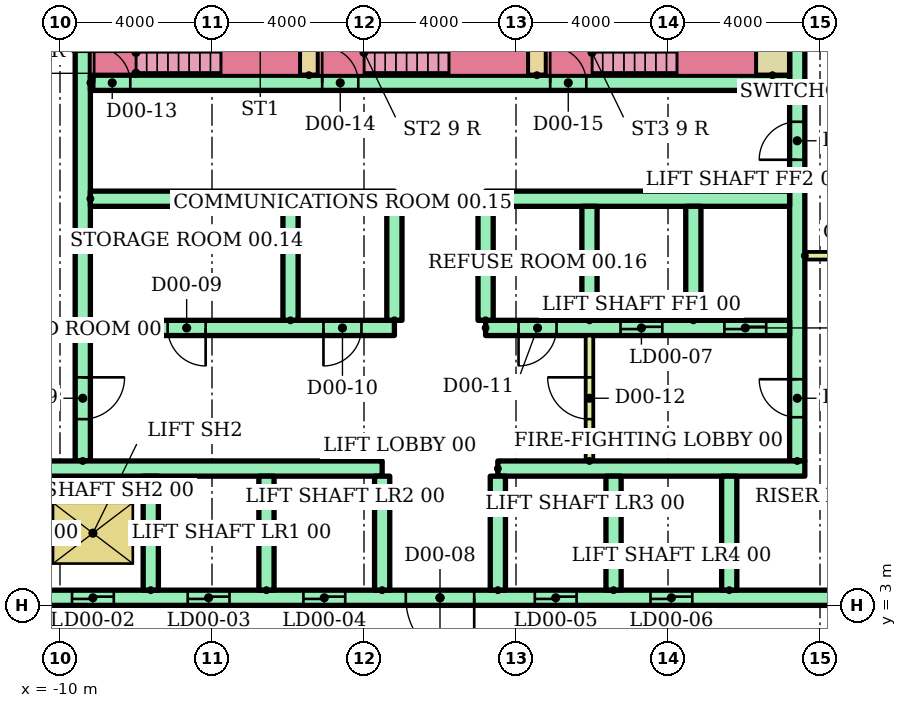
"""IFC4 building model, lengths in metres.
Left out: names, types, materials, properties, quantities, classifications, styles, units other than length and angle.
Written with IfcOpenShell. Run it as: python <this file> out.ifc"""

import sys

from ifc_helpers import new_model, si_unit, direction, frame, frame_2d, origin, place, context, subcontext, project, spatial, rectangle, extrude, element, fill, save


model = new_model("IFC4")
c1 = context("Model", 3, precision=1e-05, world=origin(), true_north=direction((0.0, 1.0)))
c2 = subcontext(c1, "Body", "Model", "MODEL_VIEW")
j1 = project(units=[si_unit("LENGTHUNIT", "METRE"), si_unit("PLANEANGLEUNIT", "RADIAN")], contexts=[c1])
p1 = place(None, origin())
s1 = spatial("IfcSite", under=j1, at=p1, CompositionType="ELEMENT")
p2 = place(p1, origin())
s2 = spatial("IfcBuilding", under=s1, at=p2, CompositionType="ELEMENT")
p3 = place(p2, origin())
s3 = spatial("IfcBuildingStorey", under=s2, at=p3, CompositionType="ELEMENT", Elevation=0.0)
p4 = place(p3, frame((-9.4, 6.8, 0.0), z_axis=(0.0, 0.0, 1.0), x_axis=(0.0, 1.0, 0.0)))
e1 = element("IfcWall", 1, at=p4, inside=s3, PredefinedType="SHEAR", context=c2, shape_type="SweptSolid", body=[
    extrude(rectangle(XDim=12.7, YDim=0.4, at=frame_2d((6.35, 0.0))), origin(), (0.0, 0.0, 1.0), 5.7),
])
p5 = place(p4, frame((1.1, 0.0, 0.0)))
e2 = element("IfcOpeningElement", 2, at=p5, cuts=e1, PredefinedType="OPENING", context=c2, shape_type="SweptSolid", body=[
    extrude(rectangle(XDim=1.1, YDim=2.1, at=frame_2d((0.55, 1.05))), frame((0.0, 0.21, 0.0), z_axis=(0.0, -1.0, 0.0), x_axis=(1.0, 0.0, 0.0)), (0.0, 0.0, 1.0), 0.42),
])
p6 = place(p3, frame((9.4, 6.8, 0.0), z_axis=(0.0, 0.0, 1.0), x_axis=(0.0, 1.0, 0.0)))
e3 = element("IfcWall", 3, at=p6, inside=s3, PredefinedType="SHEAR", context=c2, shape_type="SweptSolid", body=[
    extrude(rectangle(XDim=12.7, YDim=0.4, at=frame_2d((6.35, 0.0))), origin(), (0.0, 0.0, 1.0), 5.7),
])
p7 = place(p6, frame((1.15, 0.0, 0.0)))
e4 = element("IfcOpeningElement", 4, at=p7, cuts=e3, PredefinedType="OPENING", context=c2, shape_type="SweptSolid", body=[
    extrude(rectangle(XDim=1.0, YDim=2.1, at=frame_2d((0.5, 1.05))), frame((0.0, 0.21, 0.0), z_axis=(0.0, -1.0, 0.0), x_axis=(1.0, 0.0, 0.0)), (0.0, 0.0, 1.0), 0.42),
])
p8 = place(p6, frame((7.925, 0.0, 0.0)))
e5 = element("IfcOpeningElement", 5, at=p8, cuts=e3, PredefinedType="OPENING", context=c2, shape_type="SweptSolid", body=[
    extrude(rectangle(XDim=1.0, YDim=2.1, at=frame_2d((0.5, 1.05))), frame((0.0, 0.21, 0.0), z_axis=(0.0, -1.0, 0.0), x_axis=(1.0, 0.0, 0.0)), (0.0, 0.0, 1.0), 0.42),
])
p9 = place(p3, frame((-13.5, 3.2, 0.0)))
e6 = element("IfcWall", 6, at=p9, inside=s3, PredefinedType="SHEAR", context=c2, shape_type="SweptSolid", body=[
    extrude(rectangle(XDim=27.0, YDim=0.4, at=frame_2d((13.5, 0.0))), origin(), (0.0, 0.0, 1.0), 5.7),
])
p10 = place(p9, frame((0.772, 0.0, 0.0)))
e7 = element("IfcOpeningElement", 7, at=p10, cuts=e6, PredefinedType="OPENING", context=c2, shape_type="SweptSolid", body=[
    extrude(rectangle(XDim=1.1, YDim=2.1, at=frame_2d((0.55, 1.05))), frame((0.0, 0.21, 0.0), z_axis=(0.0, -1.0, 0.0), x_axis=(1.0, 0.0, 0.0)), (0.0, 0.0, 1.0), 0.42),
])
p11 = place(p9, frame((3.817, 0.0, 0.0)))
e8 = element("IfcOpeningElement", 8, at=p11, cuts=e6, PredefinedType="OPENING", context=c2, shape_type="SweptSolid", body=[
    extrude(rectangle(XDim=1.1, YDim=2.1, at=frame_2d((0.55, 1.05))), frame((0.0, 0.21, 0.0), z_axis=(0.0, -1.0, 0.0), x_axis=(1.0, 0.0, 0.0)), (0.0, 0.0, 1.0), 0.42),
])
p12 = place(p9, frame((6.861, 0.0, 0.0)))
e9 = element("IfcOpeningElement", 9, at=p12, cuts=e6, PredefinedType="OPENING", context=c2, shape_type="SweptSolid", body=[
    extrude(rectangle(XDim=1.1, YDim=2.1, at=frame_2d((0.55, 1.05))), frame((0.0, 0.21, 0.0), z_axis=(0.0, -1.0, 0.0), x_axis=(1.0, 0.0, 0.0)), (0.0, 0.0, 1.0), 0.42),
])
p13 = place(p9, frame((9.906, 0.0, 0.0)))
e10 = element("IfcOpeningElement", 10, at=p13, cuts=e6, PredefinedType="OPENING", context=c2, shape_type="SweptSolid", body=[
    extrude(rectangle(XDim=1.1, YDim=2.1, at=frame_2d((0.55, 1.05))), frame((0.0, 0.21, 0.0), z_axis=(0.0, -1.0, 0.0), x_axis=(1.0, 0.0, 0.0)), (0.0, 0.0, 1.0), 0.42),
])
p14 = place(p9, frame((15.994, 0.0, 0.0)))
e11 = element("IfcOpeningElement", 11, at=p14, cuts=e6, PredefinedType="OPENING", context=c2, shape_type="SweptSolid", body=[
    extrude(rectangle(XDim=1.1, YDim=2.1, at=frame_2d((0.55, 1.05))), frame((0.0, 0.21, 0.0), z_axis=(0.0, -1.0, 0.0), x_axis=(1.0, 0.0, 0.0)), (0.0, 0.0, 1.0), 0.42),
])
p15 = place(p9, frame((19.039, 0.0, 0.0)))
e12 = element("IfcOpeningElement", 12, at=p15, cuts=e6, PredefinedType="OPENING", context=c2, shape_type="SweptSolid", body=[
    extrude(rectangle(XDim=1.1, YDim=2.1, at=frame_2d((0.55, 1.05))), frame((0.0, 0.21, 0.0), z_axis=(0.0, -1.0, 0.0), x_axis=(1.0, 0.0, 0.0)), (0.0, 0.0, 1.0), 0.42),
])
p16 = place(p9, frame((12.6, 0.0, 0.0)))
e13 = element("IfcOpeningElement", 13, at=p16, cuts=e6, PredefinedType="OPENING", context=c2, shape_type="SweptSolid", body=[
    extrude(rectangle(XDim=1.8, YDim=2.1, at=frame_2d((0.9, 1.05))), frame((0.0, 0.21, 0.0), z_axis=(0.0, -1.0, 0.0), x_axis=(1.0, 0.0, 0.0)), (0.0, 0.0, 1.0), 0.42),
])
p17 = place(p3, frame((-13.5, 6.6, 0.0)))
e14 = element("IfcWall", 14, at=p17, inside=s3, PredefinedType="SHEAR", context=c2, shape_type="SweptSolid", body=[
    extrude(rectangle(XDim=11.978, YDim=0.4, at=frame_2d((5.989, 0.0))), origin(), (0.0, 0.0, 1.0), 5.7),
])
p18 = place(p3, frame((1.522, 6.6, 0.0)))
e15 = element("IfcWall", 15, at=p18, inside=s3, PredefinedType="SHEAR", context=c2, shape_type="SweptSolid", body=[
    extrude(rectangle(XDim=8.078, YDim=0.4, at=frame_2d((4.039, 0.0))), origin(), (0.0, 0.0, 1.0), 5.7),
])
for number, where, z_axis, x_axis in (
    (16, (-7.611, 3.4, 0.0), (0.0, 0.0, 1.0), (0.0, 1.0, 0.0)),
    (17, (-4.567, 3.4, 0.0), (0.0, 0.0, 1.0), (0.0, 1.0, 0.0)),
    (18, (-1.522, 3.4, 0.0), (0.0, 0.0, 1.0), (0.0, 1.0, 0.0)),
    (19, (1.522, 3.4, 0.0), (0.0, 0.0, 1.0), (0.0, 1.0, 0.0)),
    (20, (4.567, 3.4, 0.0), (0.0, 0.0, 1.0), (0.0, 1.0, 0.0)),
    (21, (7.611, 3.4, 0.0), (0.0, 0.0, 1.0), (0.0, 1.0, 0.0)),
):
    element("IfcWall", number, at=place(p3, frame(where, z_axis=z_axis, x_axis=x_axis)), inside=s3, PredefinedType="SHEAR", context=c2, shape_type="SweptSolid", body=[
        extrude(rectangle(XDim=3.0, YDim=0.4, at=frame_2d((1.5, 0.0))), origin(), (0.0, 0.0, 1.0), 5.7),
    ])
p19 = place(p3, frame((-9.2, 10.3, 0.0)))
e22 = element("IfcWall", 22, at=p19, inside=s3, PredefinedType="SHEAR", context=c2, shape_type="SweptSolid", body=[
    extrude(rectangle(XDim=8.0, YDim=0.4, at=frame_2d((4.0, 0.0))), origin(), (0.0, 0.0, 1.0), 5.7),
])
p20 = place(p19, frame((2.033, 0.0, 0.0)))
e23 = element("IfcOpeningElement", 23, at=p20, cuts=e22, PredefinedType="OPENING", context=c2, shape_type="SweptSolid", body=[
    extrude(rectangle(XDim=1.0, YDim=2.1, at=frame_2d((0.5, 1.05))), frame((0.0, 0.21, 0.0), z_axis=(0.0, -1.0, 0.0), x_axis=(1.0, 0.0, 0.0)), (0.0, 0.0, 1.0), 0.42),
])
p21 = place(p19, frame((6.133, 0.0, 0.0)))
e24 = element("IfcOpeningElement", 24, at=p21, cuts=e22, PredefinedType="OPENING", context=c2, shape_type="SweptSolid", body=[
    extrude(rectangle(XDim=1.0, YDim=2.1, at=frame_2d((0.5, 1.05))), frame((0.0, 0.21, 0.0), z_axis=(0.0, -1.0, 0.0), x_axis=(1.0, 0.0, 0.0)), (0.0, 0.0, 1.0), 0.42),
])
p22 = place(p3, frame((-9.2, 13.7, 0.0)))
e25 = element("IfcWall", 25, at=p22, inside=s3, PredefinedType="SHEAR", context=c2, shape_type="SweptSolid", body=[
    extrude(rectangle(XDim=8.0, YDim=0.4, at=frame_2d((4.0, 0.0))), origin(), (0.0, 0.0, 1.0), 5.7),
])
p23 = place(p3, frame((1.2, 10.3, 0.0)))
e26 = element("IfcWall", 26, at=p23, inside=s3, PredefinedType="SHEAR", context=c2, shape_type="SweptSolid", body=[
    extrude(rectangle(XDim=8.0, YDim=0.4, at=frame_2d((4.0, 0.0))), origin(), (0.0, 0.0, 1.0), 5.7),
])
p24 = place(p23, frame((3.55, 0.0, 0.0)))
e27 = element("IfcOpeningElement", 27, at=p24, cuts=e26, PredefinedType="OPENING", context=c2, shape_type="SweptSolid", body=[
    extrude(rectangle(XDim=1.1, YDim=2.1, at=frame_2d((0.55, 1.05))), frame((0.0, 0.21, 0.0), z_axis=(0.0, -1.0, 0.0), x_axis=(1.0, 0.0, 0.0)), (0.0, 0.0, 1.0), 0.42),
])
p25 = place(p23, frame((6.283, 0.0, 0.0)))
e28 = element("IfcOpeningElement", 28, at=p25, cuts=e26, PredefinedType="OPENING", context=c2, shape_type="SweptSolid", body=[
    extrude(rectangle(XDim=1.1, YDim=2.1, at=frame_2d((0.55, 1.05))), frame((0.0, 0.21, 0.0), z_axis=(0.0, -1.0, 0.0), x_axis=(1.0, 0.0, 0.0)), (0.0, 0.0, 1.0), 0.42),
])
p26 = place(p23, frame((0.867, 0.0, 0.0)))
e29 = element("IfcOpeningElement", 29, at=p26, cuts=e26, PredefinedType="OPENING", context=c2, shape_type="SweptSolid", body=[
    extrude(rectangle(XDim=1.0, YDim=2.1, at=frame_2d((0.5, 1.05))), frame((0.0, 0.21, 0.0), z_axis=(0.0, -1.0, 0.0), x_axis=(1.0, 0.0, 0.0)), (0.0, 0.0, 1.0), 0.42),
])
p27 = place(p3, frame((1.2, 13.7, 0.0)))
e30 = element("IfcWall", 30, at=p27, inside=s3, PredefinedType="SHEAR", context=c2, shape_type="SweptSolid", body=[
    extrude(rectangle(XDim=8.0, YDim=0.4, at=frame_2d((4.0, 0.0))), origin(), (0.0, 0.0, 1.0), 5.7),
])
for number, where, z_axis, x_axis in (
    (31, (-3.933, 10.5, 0.0), (0.0, 0.0, 1.0), (0.0, 1.0, 0.0)),
    (32, (-1.2, 10.5, 0.0), (0.0, 0.0, 1.0), (0.0, 1.0, 0.0)),
    (33, (1.2, 10.5, 0.0), (0.0, 0.0, 1.0), (0.0, 1.0, 0.0)),
    (34, (3.933, 10.5, 0.0), (0.0, 0.0, 1.0), (0.0, 1.0, 0.0)),
    (35, (6.667, 10.5, 0.0), (0.0, 0.0, 1.0), (0.0, 1.0, 0.0)),
):
    element("IfcWall", number, at=place(p3, frame(where, z_axis=z_axis, x_axis=x_axis)), inside=s3, PredefinedType="SHEAR", context=c2, shape_type="SweptSolid", body=[
        extrude(rectangle(XDim=3.0, YDim=0.4, at=frame_2d((1.5, 0.0))), origin(), (0.0, 0.0, 1.0), 5.7),
    ])
p28 = place(p3, frame((3.933, 6.8, 0.0), z_axis=(0.0, 0.0, 1.0), x_axis=(0.0, 1.0, 0.0)))
e36 = element("IfcWall", 36, at=p28, inside=s3, PredefinedType="PARTITIONING", context=c2, shape_type="SweptSolid", body=[
    extrude(rectangle(XDim=3.3, YDim=0.2, at=frame_2d((1.65, 0.0))), origin(), (0.0, 0.0, 1.0), 5.7),
])
p29 = place(p28, frame((1.1, 0.0, 0.0)))
e37 = element("IfcOpeningElement", 37, at=p29, cuts=e36, PredefinedType="OPENING", context=c2, shape_type="SweptSolid", body=[
    extrude(rectangle(XDim=1.1, YDim=2.1, at=frame_2d((0.55, 1.05))), frame((0.0, 0.11, 0.0), z_axis=(0.0, -1.0, 0.0), x_axis=(1.0, 0.0, 0.0)), (0.0, 0.0, 1.0), 0.22),
])
p30 = place(p3, frame((-9.2, 16.75, 0.0)))
e38 = element("IfcWall", 38, at=p30, inside=s3, PredefinedType="SHEAR", context=c2, shape_type="SweptSolid", body=[
    extrude(rectangle(XDim=18.4, YDim=0.4, at=frame_2d((9.2, 0.0))), origin(), (0.0, 0.0, 1.0), 5.7),
])
p31 = place(p30, frame((0.1, 0.0, 0.0)))
e39 = element("IfcOpeningElement", 39, at=p31, cuts=e38, PredefinedType="OPENING", context=c2, shape_type="SweptSolid", body=[
    extrude(rectangle(XDim=0.95, YDim=2.1, at=frame_2d((0.475, 1.05))), frame((0.0, 0.21, 0.0), z_axis=(0.0, -1.0, 0.0), x_axis=(1.0, 0.0, 0.0)), (0.0, 0.0, 1.0), 0.42),
])
p32 = place(p30, frame((6.1, 0.0, 0.0)))
e40 = element("IfcOpeningElement", 40, at=p32, cuts=e38, PredefinedType="OPENING", context=c2, shape_type="SweptSolid", body=[
    extrude(rectangle(XDim=0.95, YDim=2.1, at=frame_2d((0.475, 1.05))), frame((0.0, 0.21, 0.0), z_axis=(0.0, -1.0, 0.0), x_axis=(1.0, 0.0, 0.0)), (0.0, 0.0, 1.0), 0.42),
])
p33 = place(p30, frame((12.1, 0.0, 0.0)))
e41 = element("IfcOpeningElement", 41, at=p33, cuts=e38, PredefinedType="OPENING", context=c2, shape_type="SweptSolid", body=[
    extrude(rectangle(XDim=0.95, YDim=2.1, at=frame_2d((0.475, 1.05))), frame((0.0, 0.21, 0.0), z_axis=(0.0, -1.0, 0.0), x_axis=(1.0, 0.0, 0.0)), (0.0, 0.0, 1.0), 0.42),
])
for number, where, z_axis, x_axis in (
    (42, (-3.45, 16.95, 0.0), (0.0, 0.0, 1.0), (0.0, 1.0, 0.0)),
    (43, (2.55, 16.95, 0.0), (0.0, 0.0, 1.0), (0.0, 1.0, 0.0)),
):
    element("IfcWall", number, at=place(p3, frame(where, z_axis=z_axis, x_axis=x_axis)), inside=s3, PredefinedType="SHEAR", context=c2, shape_type="SweptSolid", body=[
        extrude(rectangle(XDim=2.55, YDim=0.5, at=frame_2d((1.275, 0.0))), origin(), (0.0, 0.0, 1.0), 5.7),
    ])
p34 = place(p3, frame((8.75, 16.95, 0.0), z_axis=(0.0, 0.0, 1.0), x_axis=(0.0, 1.0, 0.0)))
e44 = element("IfcWall", 44, at=p34, inside=s3, PredefinedType="SHEAR", context=c2, shape_type="SweptSolid", body=[
    extrude(rectangle(XDim=2.55, YDim=0.9, at=frame_2d((1.275, 0.0))), origin(), (0.0, 0.0, 1.0), 5.7),
])
p35 = place(p3, frame((9.6, 12.2, 0.0)))
e45 = element("IfcWall", 45, at=p35, inside=s3, PredefinedType="PARTITIONING", context=c2, shape_type="SweptSolid", body=[
    extrude(rectangle(XDim=3.9, YDim=0.2, at=frame_2d((1.95, 0.0))), origin(), (0.0, 0.0, 1.0), 5.7),
])
p36 = place(p11, origin())
e46 = element("IfcDoor", 46, at=p36, inside=s3, OperationType="SLIDING_TO_LEFT", PredefinedType="DOOR", context=c2, shape_type="SweptSolid", body=[
    extrude(rectangle(XDim=1.1, YDim=2.1, at=frame_2d((0.55, 1.05))), frame((0.0, 0.025, 0.0), z_axis=(0.0, -1.0, 0.0), x_axis=(1.0, 0.0, 0.0)), (0.0, 0.0, 1.0), 0.05),
])
fill(e8, e46)
p37 = place(p12, origin())
e47 = element("IfcDoor", 47, at=p37, inside=s3, OperationType="SLIDING_TO_LEFT", PredefinedType="DOOR", context=c2, shape_type="SweptSolid", body=[
    extrude(rectangle(XDim=1.1, YDim=2.1, at=frame_2d((0.55, 1.05))), frame((0.0, 0.025, 0.0), z_axis=(0.0, -1.0, 0.0), x_axis=(1.0, 0.0, 0.0)), (0.0, 0.0, 1.0), 0.05),
])
fill(e9, e47)
p38 = place(p13, origin())
e48 = element("IfcDoor", 48, at=p38, inside=s3, OperationType="SLIDING_TO_LEFT", PredefinedType="DOOR", context=c2, shape_type="SweptSolid", body=[
    extrude(rectangle(XDim=1.1, YDim=2.1, at=frame_2d((0.55, 1.05))), frame((0.0, 0.025, 0.0), z_axis=(0.0, -1.0, 0.0), x_axis=(1.0, 0.0, 0.0)), (0.0, 0.0, 1.0), 0.05),
])
fill(e10, e48)
p39 = place(p14, origin())
e49 = element("IfcDoor", 49, at=p39, inside=s3, OperationType="SLIDING_TO_LEFT", PredefinedType="DOOR", context=c2, shape_type="SweptSolid", body=[
    extrude(rectangle(XDim=1.1, YDim=2.1, at=frame_2d((0.55, 1.05))), frame((0.0, 0.025, 0.0), z_axis=(0.0, -1.0, 0.0), x_axis=(1.0, 0.0, 0.0)), (0.0, 0.0, 1.0), 0.05),
])
fill(e11, e49)
p40 = place(p15, origin())
e50 = element("IfcDoor", 50, at=p40, inside=s3, OperationType="SLIDING_TO_LEFT", PredefinedType="DOOR", context=c2, shape_type="SweptSolid", body=[
    extrude(rectangle(XDim=1.1, YDim=2.1, at=frame_2d((0.55, 1.05))), frame((0.0, 0.025, 0.0), z_axis=(0.0, -1.0, 0.0), x_axis=(1.0, 0.0, 0.0)), (0.0, 0.0, 1.0), 0.05),
])
fill(e12, e50)
p41 = place(p16, frame((1.8, 0.0, 0.0), z_axis=(0.0, 0.0, 1.0), x_axis=(-1.0, 0.0, 0.0)))
e51 = element("IfcDoor", 51, at=p41, inside=s3, OperationType="DOUBLE_DOOR_SINGLE_SWING", PredefinedType="DOOR", context=c2, shape_type="SweptSolid", body=[
    extrude(rectangle(XDim=1.8, YDim=2.1, at=frame_2d((0.9, 1.05))), frame((0.0, 0.025, 0.0), z_axis=(0.0, -1.0, 0.0), x_axis=(1.0, 0.0, 0.0)), (0.0, 0.0, 1.0), 0.05),
])
fill(e13, e51)
p42 = place(p24, origin())
e52 = element("IfcDoor", 52, at=p42, inside=s3, OperationType="SLIDING_TO_LEFT", PredefinedType="DOOR", context=c2, shape_type="SweptSolid", body=[
    extrude(rectangle(XDim=1.1, YDim=2.1, at=frame_2d((0.55, 1.05))), frame((0.0, 0.025, 0.0), z_axis=(0.0, -1.0, 0.0), x_axis=(1.0, 0.0, 0.0)), (0.0, 0.0, 1.0), 0.05),
])
fill(e27, e52)
p43 = place(p25, origin())
e53 = element("IfcDoor", 53, at=p43, inside=s3, OperationType="SLIDING_TO_LEFT", PredefinedType="DOOR", context=c2, shape_type="SweptSolid", body=[
    extrude(rectangle(XDim=1.1, YDim=2.1, at=frame_2d((0.55, 1.05))), frame((0.0, 0.025, 0.0), z_axis=(0.0, -1.0, 0.0), x_axis=(1.0, 0.0, 0.0)), (0.0, 0.0, 1.0), 0.05),
])
fill(e28, e53)
p44 = place(p20, frame((1.0, 0.0, 0.0), z_axis=(0.0, 0.0, 1.0), x_axis=(-1.0, 0.0, 0.0)))
e54 = element("IfcDoor", 54, at=p44, inside=s3, OperationType="SINGLE_SWING_RIGHT", PredefinedType="DOOR", context=c2, shape_type="SweptSolid", body=[
    extrude(rectangle(XDim=1.0, YDim=2.1, at=frame_2d((0.5, 1.05))), frame((0.0, 0.025, 0.0), z_axis=(0.0, -1.0, 0.0), x_axis=(1.0, 0.0, 0.0)), (0.0, 0.0, 1.0), 0.05),
])
fill(e23, e54)
p45 = place(p21, frame((1.0, 0.0, 0.0), z_axis=(0.0, 0.0, 1.0), x_axis=(-1.0, 0.0, 0.0)))
e55 = element("IfcDoor", 55, at=p45, inside=s3, OperationType="SINGLE_SWING_LEFT", PredefinedType="DOOR", context=c2, shape_type="SweptSolid", body=[
    extrude(rectangle(XDim=1.0, YDim=2.1, at=frame_2d((0.5, 1.05))), frame((0.0, 0.025, 0.0), z_axis=(0.0, -1.0, 0.0), x_axis=(1.0, 0.0, 0.0)), (0.0, 0.0, 1.0), 0.05),
])
fill(e24, e55)
p46 = place(p26, frame((1.0, 0.0, 0.0), z_axis=(0.0, 0.0, 1.0), x_axis=(-1.0, 0.0, 0.0)))
e56 = element("IfcDoor", 56, at=p46, inside=s3, OperationType="SINGLE_SWING_LEFT", PredefinedType="DOOR", context=c2, shape_type="SweptSolid", body=[
    extrude(rectangle(XDim=1.0, YDim=2.1, at=frame_2d((0.5, 1.05))), frame((0.0, 0.025, 0.0), z_axis=(0.0, -1.0, 0.0), x_axis=(1.0, 0.0, 0.0)), (0.0, 0.0, 1.0), 0.05),
])
fill(e29, e56)
p47 = place(p29, origin())
e57 = element("IfcDoor", 57, at=p47, inside=s3, OperationType="SINGLE_SWING_RIGHT", PredefinedType="DOOR", context=c2, shape_type="SweptSolid", body=[
    extrude(rectangle(XDim=1.1, YDim=2.1, at=frame_2d((0.55, 1.05))), frame((0.0, 0.025, 0.0), z_axis=(0.0, -1.0, 0.0), x_axis=(1.0, 0.0, 0.0)), (0.0, 0.0, 1.0), 0.05),
])
fill(e37, e57)
p48 = place(p31, origin())
e58 = element("IfcDoor", 58, at=p48, inside=s3, OperationType="SINGLE_SWING_LEFT", PredefinedType="DOOR", context=c2, shape_type="SweptSolid", body=[
    extrude(rectangle(XDim=0.95, YDim=2.1, at=frame_2d((0.475, 1.05))), frame((0.0, 0.025, 0.0), z_axis=(0.0, -1.0, 0.0), x_axis=(1.0, 0.0, 0.0)), (0.0, 0.0, 1.0), 0.05),
])
fill(e39, e58)
p49 = place(p32, origin())
e59 = element("IfcDoor", 59, at=p49, inside=s3, OperationType="SINGLE_SWING_LEFT", PredefinedType="DOOR", context=c2, shape_type="SweptSolid", body=[
    extrude(rectangle(XDim=0.95, YDim=2.1, at=frame_2d((0.475, 1.05))), frame((0.0, 0.025, 0.0), z_axis=(0.0, -1.0, 0.0), x_axis=(1.0, 0.0, 0.0)), (0.0, 0.0, 1.0), 0.05),
])
fill(e40, e59)
p50 = place(p33, origin())
e60 = element("IfcDoor", 60, at=p50, inside=s3, OperationType="SINGLE_SWING_LEFT", PredefinedType="DOOR", context=c2, shape_type="SweptSolid", body=[
    extrude(rectangle(XDim=0.95, YDim=2.1, at=frame_2d((0.475, 1.05))), frame((0.0, 0.025, 0.0), z_axis=(0.0, -1.0, 0.0), x_axis=(1.0, 0.0, 0.0)), (0.0, 0.0, 1.0), 0.05),
])
fill(e41, e60)
p51 = place(p5, frame((1.1, 0.0, 0.0), z_axis=(0.0, 0.0, 1.0), x_axis=(-1.0, 0.0, 0.0)))
e61 = element("IfcDoor", 61, at=p51, inside=s3, OperationType="SINGLE_SWING_RIGHT", PredefinedType="DOOR", context=c2, shape_type="SweptSolid", body=[
    extrude(rectangle(XDim=1.1, YDim=2.1, at=frame_2d((0.55, 1.05))), frame((0.0, 0.025, 0.0), z_axis=(0.0, -1.0, 0.0), x_axis=(1.0, 0.0, 0.0)), (0.0, 0.0, 1.0), 0.05),
])
fill(e2, e61)
p52 = place(p7, origin())
e62 = element("IfcDoor", 62, at=p52, inside=s3, OperationType="SINGLE_SWING_RIGHT", PredefinedType="DOOR", context=c2, shape_type="SweptSolid", body=[
    extrude(rectangle(XDim=1.0, YDim=2.1, at=frame_2d((0.5, 1.05))), frame((0.0, 0.025, 0.0), z_axis=(0.0, -1.0, 0.0), x_axis=(1.0, 0.0, 0.0)), (0.0, 0.0, 1.0), 0.05),
])
fill(e4, e62)
p53 = place(p8, origin())
e63 = element("IfcDoor", 63, at=p53, inside=s3, OperationType="SINGLE_SWING_LEFT", PredefinedType="DOOR", context=c2, shape_type="SweptSolid", body=[
    extrude(rectangle(XDim=1.0, YDim=2.1, at=frame_2d((0.5, 1.05))), frame((0.0, 0.025, 0.0), z_axis=(0.0, -1.0, 0.0), x_axis=(1.0, 0.0, 0.0)), (0.0, 0.0, 1.0), 0.05),
])
fill(e5, e63)
save(model, sys.argv[1])
